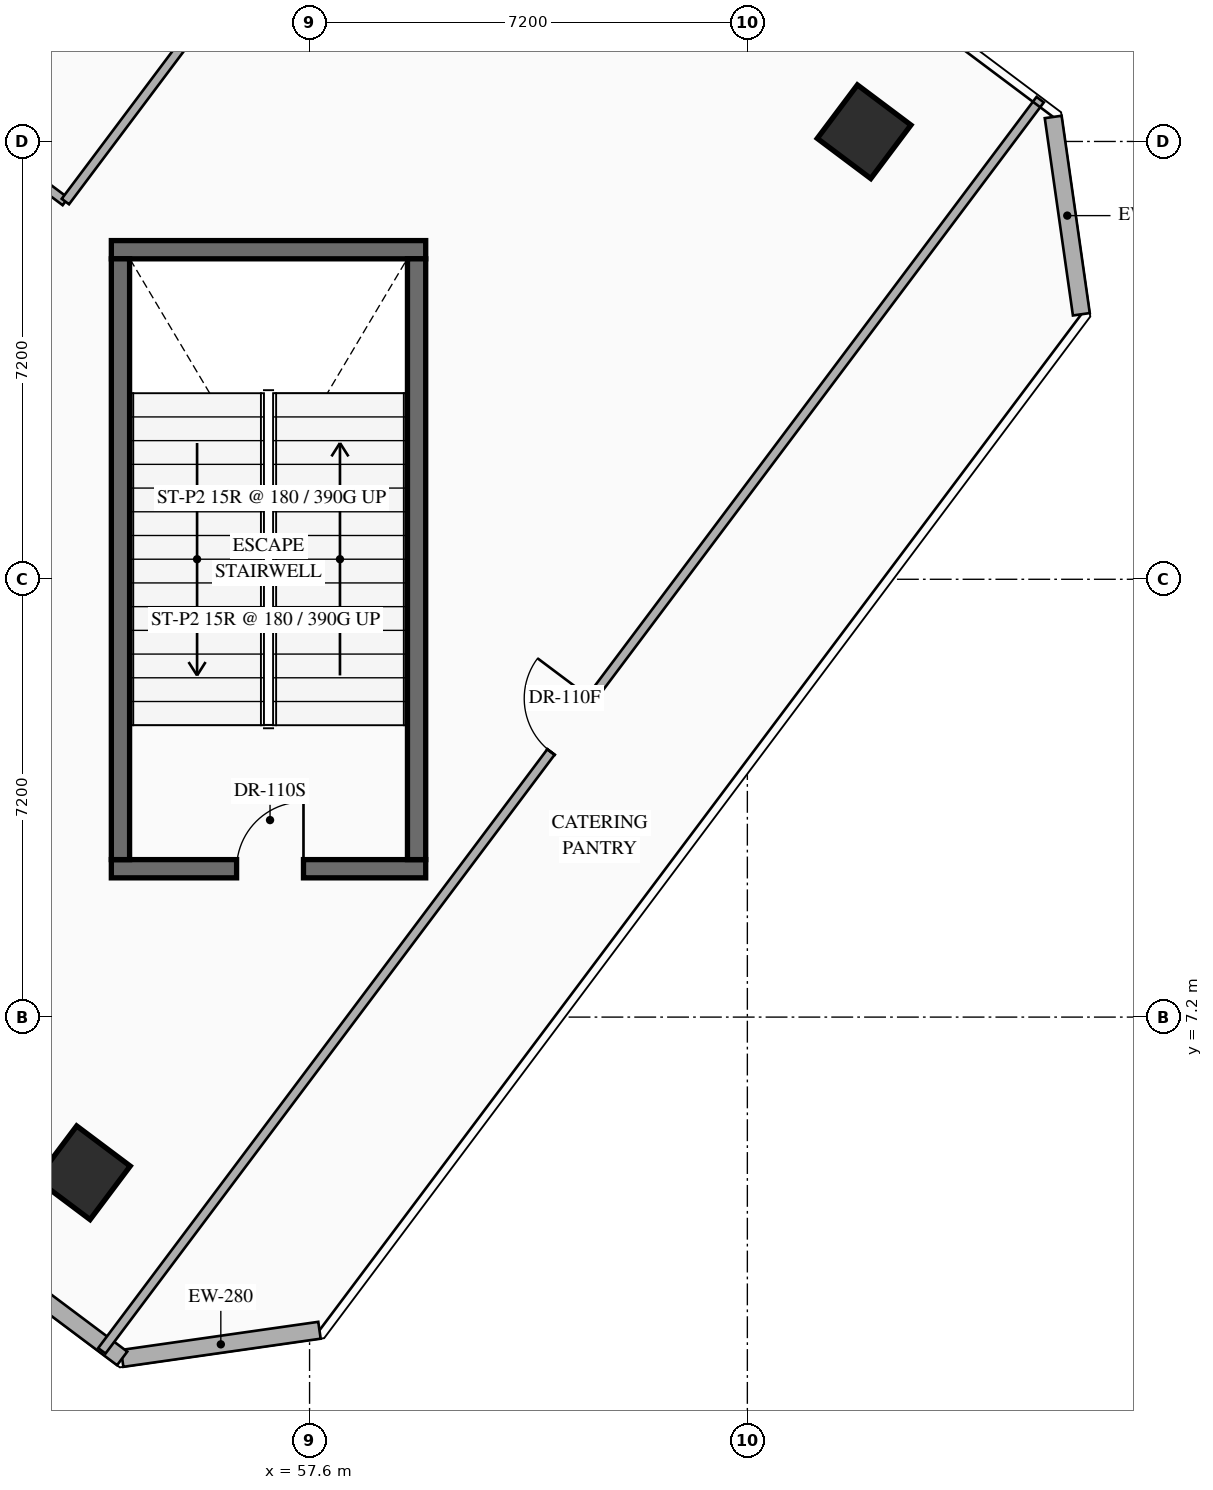
"""IFC4 building model, lengths in metres.
Left out: names, types, materials, properties, quantities, classifications, styles, units other than length and angle.
Written with IfcOpenShell. Run it as: python <this file> out.ifc"""

import sys

from ifc_helpers import new_model, si_unit, direction, frame, frame_2d, origin, origin_2d, place, context, subcontext, project, spatial, rectangle, hollow_rectangle, extrude, element, fill, save


model = new_model("IFC4")
c1 = context("Model", 3, precision=1e-05, world=origin(), true_north=direction((0.0, 1.0)))
c2 = subcontext(c1, "Body", "Model", "MODEL_VIEW")
j1 = project(units=[si_unit("LENGTHUNIT", "METRE"), si_unit("PLANEANGLEUNIT", "RADIAN")], contexts=[c1])
p1 = place(None, origin())
s1 = spatial("IfcSite", under=j1, at=p1, CompositionType="ELEMENT")
p2 = place(p1, origin())
s2 = spatial("IfcBuilding", under=s1, at=p2, CompositionType="ELEMENT")
p3 = place(p2, frame((0.0, 0.0, 16.2)))
s3 = spatial("IfcBuildingStorey", under=s2, at=p3, CompositionType="ELEMENT", Elevation=16.2)
p4 = place(p3, frame((54.34, 9.64, 0.0), z_axis=(0.0, 0.0, 1.0), x_axis=(1.0, 0.0, 0.0)))
e1 = element("IfcWall", 1, at=p4, inside=s3, PredefinedType="SHEAR", context=c2, shape_type="SweptSolid", body=[
    extrude(rectangle(XDim=5.17, YDim=0.3, at=frame_2d((2.585, 0.0))), origin(), (0.0, 0.0, 1.0), 5.4),
])
p5 = place(p4, frame((2.06, 0.0, 0.0)))
e2 = element("IfcOpeningElement", 2, at=p5, cuts=e1, PredefinedType="OPENING", context=c2, shape_type="SweptSolid", body=[
    extrude(rectangle(XDim=1.1, YDim=2.2, at=frame_2d((0.55, 1.1))), frame((0.0, 0.16, 0.0), z_axis=(0.0, -1.0, 0.0), x_axis=(1.0, 0.0, 0.0)), (0.0, 0.0, 1.0), 0.32),
])
p6 = place(p3, frame((54.34, 19.82, 0.0), z_axis=(0.0, 0.0, 1.0), x_axis=(1.0, 0.0, 0.0)))
e3 = element("IfcWall", 3, at=p6, inside=s3, PredefinedType="SHEAR", context=c2, shape_type="SweptSolid", body=[
    extrude(rectangle(XDim=5.17, YDim=0.3, at=frame_2d((2.585, 0.0))), origin(), (0.0, 0.0, 1.0), 5.4),
])
for number, where, z_axis, x_axis in (
    (4, (54.49, 9.79, 0.0), (0.0, 0.0, 1.0), (0.0, 1.0, 0.0)),
    (5, (59.36, 9.79, 0.0), (0.0, 0.0, 1.0), (0.0, 1.0, 0.0)),
):
    element("IfcWall", number, at=place(p3, frame(where, z_axis=z_axis, x_axis=x_axis)), inside=s3, PredefinedType="SHEAR", context=c2, shape_type="SweptSolid", body=[
        extrude(rectangle(XDim=9.88, YDim=0.3, at=frame_2d((4.94, 0.0))), origin(), (0.0, 0.0, 1.0), 5.4),
    ])
for number, where, z_axis, x_axis in (
    (6, (53.88, 4.64, 0.0), (0.0, 0.0, 1.0), (0.8, -0.6, 0.0)),
    (7, (66.72, 21.76, 0.0), (0.0, 0.0, 1.0), (0.8, -0.6, 0.0)),
):
    element("IfcColumn", number, at=place(p3, frame(where, z_axis=z_axis, x_axis=x_axis)), inside=s3, PredefinedType="COLUMN", context=c2, shape_type="SweptSolid", body=[
        extrude(hollow_rectangle(XDim=1.1, YDim=1.1, WallThickness=0.04, at=origin_2d()), origin(), (0.0, 0.0, 1.0), 5.4),
    ])
for number, where, z_axis, x_axis in (
    (8, (69.83, 22.003, 0.0), (0.0, 0.0, 1.0), (0.141, -0.99, 0.0)),
    (9, (57.763, 2.05, 0.0), (0.0, 0.0, 1.0), (-0.99, -0.141, 0.0)),
):
    element("IfcWall", number, at=place(p3, frame(where, z_axis=z_axis, x_axis=x_axis)), inside=s3, PredefinedType="STANDARD", context=c2, shape_type="SweptSolid", body=[
        extrude(rectangle(XDim=3.278, YDim=0.28, at=frame_2d((1.639, 0.0))), origin(), (0.0, 0.0, 1.0), 5.1),
    ])
p7 = place(p3, frame((54.518, 1.587, 0.0), z_axis=(0.0, 0.0, 1.0), x_axis=(-0.800001601415, 0.599997864774, 0.0)))
e10 = element("IfcWall", 10, at=p7, inside=s3, PredefinedType="STANDARD", context=c2, shape_type="SweptSolid", body=[
    extrude(rectangle(XDim=36.589, YDim=0.28, at=frame_2d((18.294, 0.0))), origin(), (0.0, 0.0, 1.0), 5.1),
])
p8 = place(p3, frame((48.64, 24.32, 0.0), z_axis=(0.0, 0.0, 1.0), x_axis=(0.80000474051, -0.599993679268, 0.0)))
e11 = element("IfcWall", 11, at=p8, inside=s3, PredefinedType="PARTITIONING", context=c2, shape_type="SweptSolid", body=[
    extrude(rectangle(XDim=6.18, YDim=0.15, at=frame_2d((3.09, 0.0))), origin(), (0.0, 0.0, 1.0), 5.1),
])
p9 = place(p8, frame((2.54, 0.0, 0.0)))
e12 = element("IfcOpeningElement", 12, at=p9, cuts=e11, PredefinedType="OPENING", context=c2, shape_type="SweptSolid", body=[
    extrude(rectangle(XDim=1.1, YDim=2.16, at=frame_2d((0.55, 1.08))), frame((0.0, 0.085, 0.0), z_axis=(0.0, -1.0, 0.0), x_axis=(1.0, 0.0, 0.0)), (0.0, 0.0, 1.0), 0.17),
])
p10 = place(p3, frame((53.584, 20.612, 0.0), z_axis=(0.0, 0.0, 1.0), x_axis=(0.600003564151, 0.799997326874, 0.0)))
e13 = element("IfcWall", 13, at=p10, inside=s3, PredefinedType="PARTITIONING", context=c2, shape_type="SweptSolid", body=[
    extrude(rectangle(XDim=10.96, YDim=0.15, at=frame_2d((5.48, 0.0))), origin(), (0.0, 0.0, 1.0), 5.1),
])
p11 = place(p3, frame((54.184, 1.712, 0.0), z_axis=(0.0, 0.0, 1.0), x_axis=(0.59999392496, 0.800004556244, 0.0)))
e14 = element("IfcWall", 14, at=p11, inside=s3, PredefinedType="PARTITIONING", context=c2, shape_type="SweptSolid", body=[
    extrude(rectangle(XDim=25.72, YDim=0.15, at=frame_2d((12.86, 0.0))), origin(), (0.0, 0.0, 1.0), 5.1),
])
p12 = place(p11, frame((12.31, 0.0, 0.0)))
e15 = element("IfcOpeningElement", 15, at=p12, cuts=e14, PredefinedType="OPENING", context=c2, shape_type="SweptSolid", body=[
    extrude(rectangle(XDim=1.1, YDim=2.24, at=frame_2d((0.55, 1.12))), frame((0.0, 0.085, 0.0), z_axis=(0.0, -1.0, 0.0), x_axis=(1.0, 0.0, 0.0)), (0.0, 0.0, 1.0), 0.17),
])
p13 = place(p5, origin())
e16 = element("IfcDoor", 16, at=p13, inside=s3, OperationType="SINGLE_SWING_RIGHT", PredefinedType="DOOR", context=c2, shape_type="SweptSolid", body=[
    extrude(rectangle(XDim=1.1, YDim=2.2, at=frame_2d((0.55, 1.1))), frame((0.0, 0.025, 0.0), z_axis=(0.0, -1.0, 0.0), x_axis=(1.0, 0.0, 0.0)), (0.0, 0.0, 1.0), 0.05),
])
fill(e2, e16)
p14 = place(p12, origin())
e17 = element("IfcDoor", 17, at=p14, inside=s3, OperationType="SINGLE_SWING_RIGHT", PredefinedType="DOOR", context=c2, shape_type="SweptSolid", body=[
    extrude(rectangle(XDim=1.1, YDim=2.24, at=frame_2d((0.55, 1.12))), frame((0.0, 0.025, 0.0), z_axis=(0.0, -1.0, 0.0), x_axis=(1.0, 0.0, 0.0)), (0.0, 0.0, 1.0), 0.05),
])
fill(e15, e17)
save(model, sys.argv[1])
